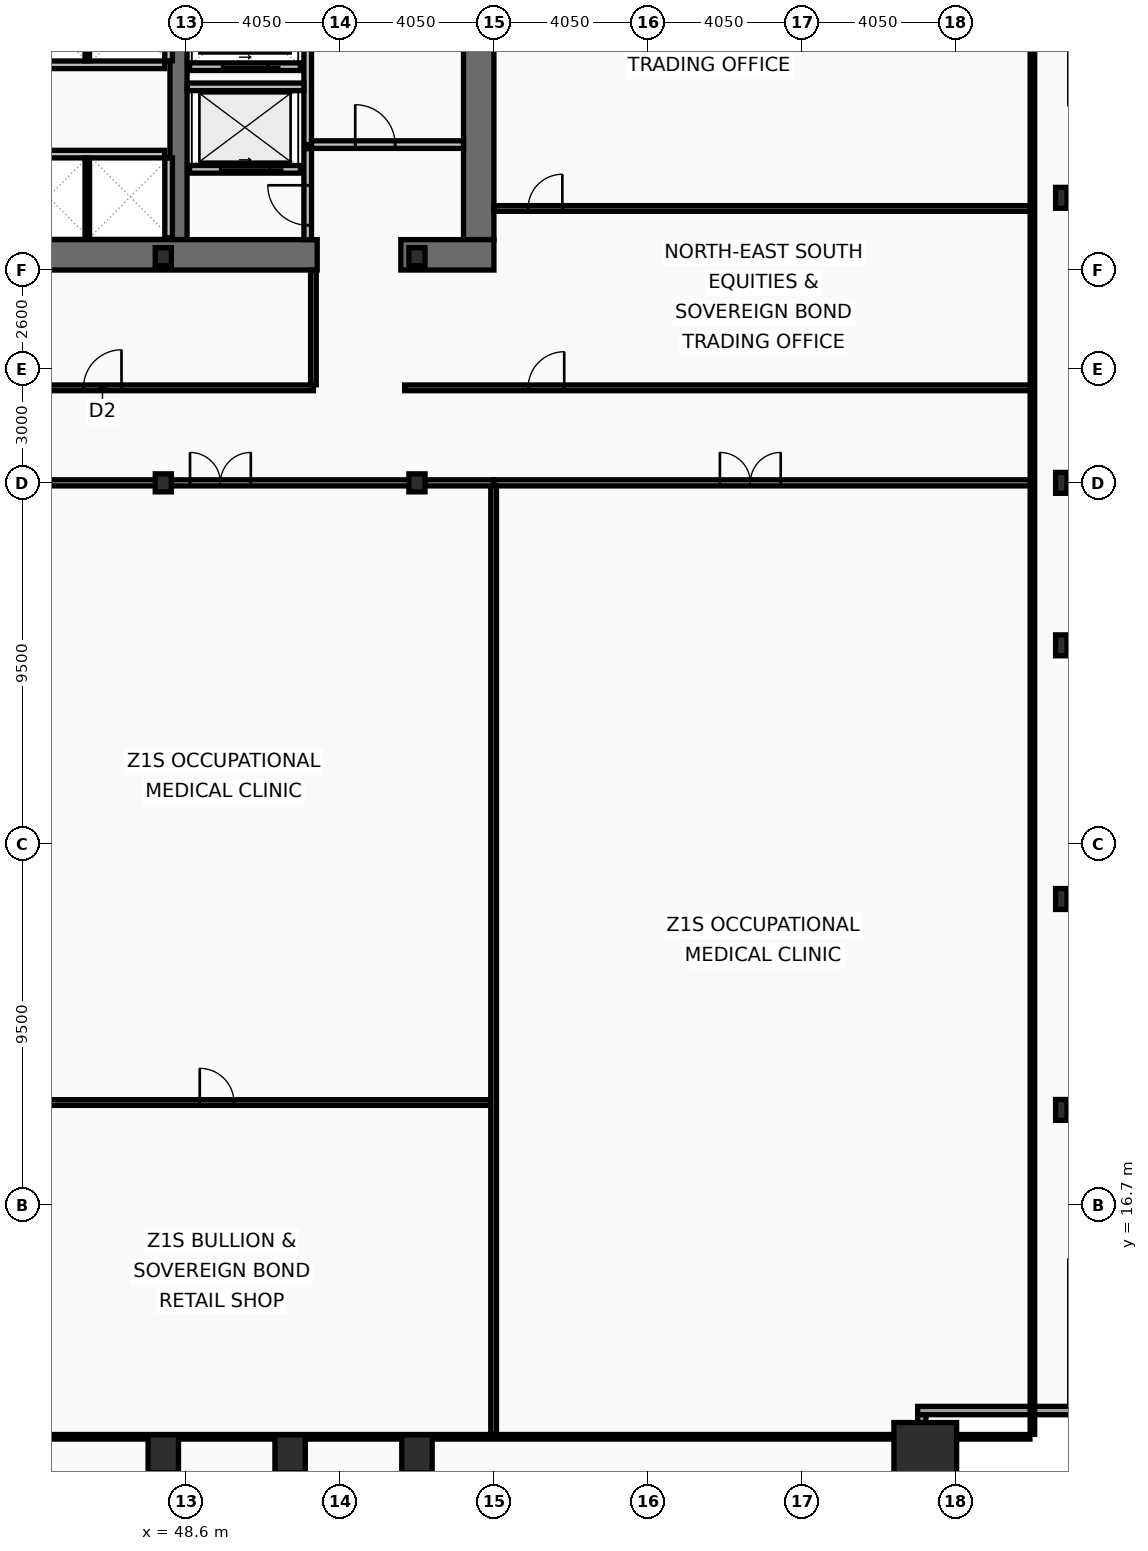
"""IFC4 building model, lengths in metres.
Left out: names, types, materials, properties, quantities, classifications, styles, units other than length and angle.
Written with IfcOpenShell. Run it as: python <this file> out.ifc"""

import sys

from ifc_helpers import new_model, si_unit, direction, frame, frame_2d, origin, origin_2d, place, context, subcontext, project, spatial, rectangle, hollow_rectangle, i_section, extrude, element, fill, save


model = new_model("IFC4")
c1 = context("Model", 3, precision=1e-05, world=origin(), true_north=direction((0.0, 1.0)))
c2 = subcontext(c1, "Body", "Model", "MODEL_VIEW")
j1 = project(units=[si_unit("LENGTHUNIT", "METRE"), si_unit("PLANEANGLEUNIT", "RADIAN")], contexts=[c1])
p1 = place(None, origin())
s1 = spatial("IfcSite", under=j1, at=p1, CompositionType="ELEMENT")
p2 = place(p1, origin())
s2 = spatial("IfcBuilding", under=s1, at=p2, CompositionType="ELEMENT")
p3 = place(p2, frame((0.0, 0.0, 29.8)))
s3 = spatial("IfcBuildingStorey", under=s2, at=p3, CompositionType="ELEMENT", Elevation=29.8)
p4 = place(p3, frame((56.3, 52.9, 0.0), z_axis=(0.0, 0.0, 1.0), x_axis=(0.0, -1.0, 0.0)))
e1 = element("IfcWall", 1, at=p4, inside=s3, PredefinedType="SHEAR", context=c2, shape_type="SweptSolid", body=[
    extrude(rectangle(XDim=10.8, YDim=0.8, at=frame_2d((5.4, 0.0))), origin(), (0.0, 0.0, 1.0), 3.82),
])
p5 = place(p3, frame((48.4, 42.1, 0.0), z_axis=(0.0, 0.0, 1.0), x_axis=(0.0, 1.0, 0.0)))
e2 = element("IfcWall", 2, at=p5, inside=s3, PredefinedType="SHEAR", context=c2, shape_type="SweptSolid", body=[
    extrude(rectangle(XDim=10.8, YDim=0.45, at=frame_2d((5.4, 0.0))), origin(), (0.0, 0.0, 1.0), 3.82),
])
p6 = place(p3, frame((52.05, 41.7, 0.0), z_axis=(0.0, 0.0, 1.0), x_axis=(-1.0, 0.0, 0.0)))
e3 = element("IfcWall", 3, at=p6, inside=s3, PredefinedType="SHEAR", context=c2, shape_type="SweptSolid", body=[
    extrude(rectangle(XDim=11.3, YDim=0.8, at=frame_2d((5.65, 0.0))), origin(), (0.0, 0.0, 1.0), 3.82),
])
p7 = place(p3, frame((56.7, 41.7, 0.0), z_axis=(0.0, 0.0, 1.0), x_axis=(-1.0, 0.0, 0.0)))
e4 = element("IfcWall", 4, at=p7, inside=s3, PredefinedType="SHEAR", context=c2, shape_type="SweptSolid", body=[
    extrude(rectangle(XDim=2.45, YDim=0.8, at=frame_2d((1.225, 0.0))), origin(), (0.0, 0.0, 1.0), 3.82),
])
p8 = place(p3, frame((68.05, 10.15, 0.0), z_axis=(0.0, 0.0, 1.0), x_axis=(1.0, 0.0, 0.0)))
e5 = element("IfcColumn", 5, at=p8, inside=s3, PredefinedType="COLUMN", context=c2, shape_type="SweptSolid", body=[
    extrude(hollow_rectangle(XDim=1.65, YDim=1.65, WallThickness=0.075, at=origin_2d()), origin(), (0.0, 0.0, 1.0), 4.0),
])
for number, where, z_axis, x_axis in (
    (6, (48.0, 10.15, 0.0), (0.0, 0.0, 1.0), (1.0, 0.0, 0.0)),
    (7, (51.337, 10.15, 0.0), (0.0, 0.0, 1.0), (1.0, 0.0, 0.0)),
    (8, (54.675, 10.15, 0.0), (0.0, 0.0, 1.0), (1.0, 0.0, 0.0)),
):
    element("IfcColumn", number, at=place(p3, frame(where, z_axis=z_axis, x_axis=x_axis)), inside=s3, PredefinedType="COLUMN", context=c2, shape_type="SweptSolid", body=[
        extrude(hollow_rectangle(XDim=0.8, YDim=1.0, WallThickness=0.055, at=origin_2d()), origin(), (0.0, 0.0, 1.0), 4.0),
    ])
for number, where, z_axis, x_axis in (
    (9, (71.63, 19.2, 0.0), (0.0, 0.0, 1.0), (1.0, 0.0, 0.0)),
    (10, (71.63, 24.75, 0.0), (0.0, 0.0, 1.0), (1.0, 0.0, 0.0)),
    (11, (71.63, 31.425, 0.0), (0.0, 0.0, 1.0), (1.0, 0.0, 0.0)),
    (12, (71.63, 35.7, 0.0), (0.0, 0.0, 1.0), (1.0, 0.0, 0.0)),
    (13, (71.63, 43.2, 0.0), (0.0, 0.0, 1.0), (1.0, 0.0, 0.0)),
):
    element("IfcColumn", number, at=place(p3, frame(where, z_axis=z_axis, x_axis=x_axis)), inside=s3, PredefinedType="COLUMN", context=c2, shape_type="SweptSolid", body=[
        extrude(i_section(OverallWidth=0.3, OverallDepth=0.55, WebThickness=0.015, FlangeThickness=0.029, at=origin_2d()), origin(), (0.0, 0.0, 1.0), 4.0),
    ])
for number, where, z_axis, x_axis in (
    (14, (48.0, 35.7, 0.0), (0.0, 0.0, 1.0), (1.0, 0.0, 0.0)),
    (15, (48.0, 41.65, 0.0), (0.0, 0.0, 1.0), (1.0, 0.0, 0.0)),
    (16, (54.675, 35.7, 0.0), (0.0, 0.0, 1.0), (1.0, 0.0, 0.0)),
    (17, (54.675, 41.65, 0.0), (0.0, 0.0, 1.0), (1.0, 0.0, 0.0)),
):
    element("IfcColumn", number, at=place(p3, frame(where, z_axis=z_axis, x_axis=x_axis)), inside=s3, PredefinedType="COLUMN", context=c2, shape_type="SweptSolid", body=[
        extrude(i_section(OverallWidth=0.424, OverallDepth=0.474, WebThickness=0.048, FlangeThickness=0.077, at=origin_2d()), origin(), (0.0, 0.0, 1.0), 4.0),
    ])
p9 = place(p3, frame((72.07, 11.29, 0.0), z_axis=(0.0, 0.0, 1.0), x_axis=(-1.0, 0.0, 0.0)))
e18 = element("IfcWall", 18, at=p9, inside=s3, PredefinedType="SOLIDWALL", context=c2, shape_type="SweptSolid", body=[
    extrude(rectangle(XDim=4.22, YDim=0.22, at=frame_2d((2.11, 0.0))), origin(), (0.0, 0.0, 1.0), 3.16),
])
p10 = place(p3, frame((67.96, 11.18, 0.0), z_axis=(0.0, 0.0, 1.0), x_axis=(0.0, -1.0, 0.0)))
e19 = element("IfcWall", 19, at=p10, inside=s3, PredefinedType="SOLIDWALL", context=c2, shape_type="SweptSolid", body=[
    extrude(rectangle(XDim=3.91, YDim=0.22, at=frame_2d((1.955, 0.0))), origin(), (0.0, 0.0, 1.0), 3.16),
])
p11 = place(p3, frame((51.61, 43.95, 0.0), z_axis=(0.0, 0.0, 1.0), x_axis=(-1.0, 0.0, 0.0)))
e20 = element("IfcWall", 20, at=p11, inside=s3, PredefinedType="PARTITIONING", context=c2, shape_type="SweptSolid", body=[
    extrude(rectangle(XDim=2.92, YDim=0.2, at=frame_2d((1.46, 0.0))), origin(), (0.0, 0.0, 1.0), 3.82),
])
p12 = place(p11, frame((0.81, 0.0, 0.0)))
e21 = element("IfcOpeningElement", 21, at=p12, cuts=e20, PredefinedType="OPENING", context=c2, shape_type="SweptSolid", body=[
    extrude(rectangle(XDim=1.3, YDim=2.18, at=frame_2d((0.65, 1.09))), frame((0.0, 0.11, 0.0), z_axis=(0.0, -1.0, 0.0), x_axis=(1.0, 0.0, 0.0)), (0.0, 0.0, 1.0), 0.22),
])
p13 = place(p3, frame((51.61, 46.65, 0.0), z_axis=(0.0, 0.0, 1.0), x_axis=(-1.0, 0.0, 0.0)))
e22 = element("IfcWall", 22, at=p13, inside=s3, PredefinedType="PARTITIONING", context=c2, shape_type="SweptSolid", body=[
    extrude(rectangle(XDim=2.92, YDim=0.2, at=frame_2d((1.46, 0.0))), origin(), (0.0, 0.0, 1.0), 3.82),
])
p14 = place(p13, frame((0.86, 0.0, 0.0)))
e23 = element("IfcOpeningElement", 23, at=p14, cuts=e22, PredefinedType="OPENING", context=c2, shape_type="SweptSolid", body=[
    extrude(rectangle(XDim=1.2, YDim=2.18, at=frame_2d((0.6, 1.09))), frame((0.0, 0.11, 0.0), z_axis=(0.0, -1.0, 0.0), x_axis=(1.0, 0.0, 0.0)), (0.0, 0.0, 1.0), 0.22),
])
p15 = place(p3, frame((51.8, 44.6, 0.0), z_axis=(0.0, 0.0, 1.0), x_axis=(0.0, 1.0, 0.0)))
e24 = element("IfcWall", 24, at=p15, inside=s3, PredefinedType="PARTITIONING", context=c2, shape_type="SweptSolid", body=[
    extrude(rectangle(XDim=4.3, YDim=0.2, at=frame_2d((2.15, 0.0))), origin(), (0.0, 0.0, 1.0), 3.82),
])
p16 = place(p3, frame((51.9, 44.6, 0.0), z_axis=(0.0, 0.0, 1.0), x_axis=(1.0, 0.0, 0.0)))
e25 = element("IfcWall", 25, at=p16, inside=s3, PredefinedType="PARTITIONING", context=c2, shape_type="SweptSolid", body=[
    extrude(rectangle(XDim=4.0, YDim=0.2, at=frame_2d((2.0, 0.0))), origin(), (0.0, 0.0, 1.0), 3.82),
])
p17 = place(p16, frame((1.15, 0.0, 0.0)))
e26 = element("IfcOpeningElement", 26, at=p17, cuts=e25, PredefinedType="OPENING", context=c2, shape_type="SweptSolid", body=[
    extrude(rectangle(XDim=1.05, YDim=2.15, at=frame_2d((0.525, 1.075))), frame((0.0, 0.11, 0.0), z_axis=(0.0, -1.0, 0.0), x_axis=(1.0, 0.0, 0.0)), (0.0, 0.0, 1.0), 0.22),
])
p18 = place(p3, frame((48.63, 46.12, 0.0), z_axis=(0.0, 0.0, 1.0), x_axis=(1.0, 0.0, 0.0)))
e27 = element("IfcWall", 27, at=p18, inside=s3, PredefinedType="PARTITIONING", context=c2, shape_type="SweptSolid", body=[
    extrude(rectangle(XDim=3.07, YDim=0.2, at=frame_2d((1.535, 0.0))), origin(), (0.0, 0.0, 1.0), 3.82),
])
p19 = place(p3, frame((51.8, 42.1, 0.0), z_axis=(0.0, 0.0, 1.0), x_axis=(0.0, 1.0, 0.0)))
e28 = element("IfcWall", 28, at=p19, inside=s3, PredefinedType="PARTITIONING", context=c2, shape_type="SweptSolid", body=[
    extrude(rectangle(XDim=2.395, YDim=0.2, at=frame_2d((1.198, 0.0))), origin(), (0.0, 0.0, 1.0), 3.82),
])
p20 = place(p19, frame((0.38, 0.0, 0.0)))
e29 = element("IfcOpeningElement", 29, at=p20, cuts=e28, PredefinedType="OPENING", context=c2, shape_type="SweptSolid", body=[
    extrude(rectangle(XDim=1.05, YDim=2.15, at=frame_2d((0.525, 1.075))), frame((0.0, 0.11, 0.0), z_axis=(0.0, -1.0, 0.0), x_axis=(1.0, 0.0, 0.0)), (0.0, 0.0, 1.0), 0.22),
])
p21 = place(p3, frame((41.825, 46.7, 0.0), z_axis=(0.0, 0.0, 1.0), x_axis=(1.0, 0.0, 0.0)))
e30 = element("IfcWall", 30, at=p21, inside=s3, PredefinedType="PARTITIONING", context=c2, shape_type="SweptSolid", body=[
    extrude(rectangle(XDim=6.21, YDim=0.2, at=frame_2d((3.105, 0.0))), origin(), (0.0, 0.0, 1.0), 3.82),
])
p22 = place(p3, frame((48.14, 46.805, 0.0), z_axis=(0.0, 0.0, 1.0), x_axis=(0.0, 1.0, 0.0)))
e31 = element("IfcWall", 31, at=p22, inside=s3, PredefinedType="PARTITIONING", context=c2, shape_type="SweptSolid", body=[
    extrude(rectangle(XDim=2.09, YDim=0.2, at=frame_2d((1.045, 0.0))), origin(), (0.0, 0.0, 1.0), 3.82),
])
p23 = place(p3, frame((46.0, 46.805, 0.0), z_axis=(0.0, 0.0, 1.0), x_axis=(0.0, 1.0, 0.0)))
e32 = element("IfcWall", 32, at=p23, inside=s3, PredefinedType="PARTITIONING", context=c2, shape_type="SweptSolid", body=[
    extrude(rectangle(XDim=2.09, YDim=0.12, at=frame_2d((1.045, 0.0))), origin(), (0.0, 0.0, 1.0), 3.82),
])
p24 = place(p3, frame((41.825, 44.35, 0.0), z_axis=(0.0, 0.0, 1.0), x_axis=(1.0, 0.0, 0.0)))
e33 = element("IfcWall", 33, at=p24, inside=s3, PredefinedType="PARTITIONING", context=c2, shape_type="SweptSolid", body=[
    extrude(rectangle(XDim=6.21, YDim=0.2, at=frame_2d((3.105, 0.0))), origin(), (0.0, 0.0, 1.0), 3.82),
])
p25 = place(p3, frame((48.14, 42.15, 0.0), z_axis=(0.0, 0.0, 1.0), x_axis=(0.0, 1.0, 0.0)))
e34 = element("IfcWall", 34, at=p25, inside=s3, PredefinedType="PARTITIONING", context=c2, shape_type="SweptSolid", body=[
    extrude(rectangle(XDim=2.095, YDim=0.2, at=frame_2d((1.048, 0.0))), origin(), (0.0, 0.0, 1.0), 3.82),
])
p26 = place(p3, frame((46.0, 42.15, 0.0), z_axis=(0.0, 0.0, 1.0), x_axis=(0.0, 1.0, 0.0)))
e35 = element("IfcWall", 35, at=p26, inside=s3, PredefinedType="PARTITIONING", context=c2, shape_type="SweptSolid", body=[
    extrude(rectangle(XDim=2.095, YDim=0.12, at=frame_2d((1.048, 0.0))), origin(), (0.0, 0.0, 1.0), 3.82),
])
p27 = place(p3, frame((44.8, 38.2, 0.0), z_axis=(0.0, 0.0, 1.0), x_axis=(1.0, 0.0, 0.0)))
e36 = element("IfcWall", 36, at=p27, inside=s3, PredefinedType="PARTITIONING", context=c2, shape_type="SweptSolid", body=[
    extrude(rectangle(XDim=7.15, YDim=0.15, at=frame_2d((3.575, 0.0))), origin(), (0.0, 0.0, 1.0), 3.01),
])
p28 = place(p27, frame((1.1, 0.0, 0.0)))
e37 = element("IfcOpeningElement", 37, at=p28, cuts=e36, PredefinedType="OPENING", context=c2, shape_type="SweptSolid", body=[
    extrude(rectangle(XDim=1.0, YDim=2.05, at=frame_2d((0.5, 1.025))), frame((0.0, 0.085, 0.0), z_axis=(0.0, -1.0, 0.0), x_axis=(1.0, 0.0, 0.0)), (0.0, 0.0, 1.0), 0.17),
])
p29 = place(p3, frame((51.95, 38.28, 0.0), z_axis=(0.0, 0.0, 1.0), x_axis=(0.0, 1.0, 0.0)))
e38 = element("IfcWall", 38, at=p29, inside=s3, PredefinedType="PARTITIONING", context=c2, shape_type="SweptSolid", body=[
    extrude(rectangle(XDim=3.02, YDim=0.15, at=frame_2d((1.51, 0.0))), origin(), (0.0, 0.0, 1.0), 3.82),
])
p30 = place(p3, frame((54.35, 38.2, 0.0), z_axis=(0.0, 0.0, 1.0), x_axis=(1.0, 0.0, 0.0)))
e39 = element("IfcWall", 39, at=p30, inside=s3, PredefinedType="PARTITIONING", context=c2, shape_type="SweptSolid", body=[
    extrude(rectangle(XDim=16.52, YDim=0.15, at=frame_2d((8.26, 0.0))), origin(), (0.0, 0.0, 1.0), 3.01),
])
p31 = place(p30, frame((3.25, 0.0, 0.0)))
e40 = element("IfcOpeningElement", 40, at=p31, cuts=e39, PredefinedType="OPENING", context=c2, shape_type="SweptSolid", body=[
    extrude(rectangle(XDim=0.95, YDim=2.05, at=frame_2d((0.475, 1.025))), frame((0.0, 0.085, 0.0), z_axis=(0.0, -1.0, 0.0), x_axis=(1.0, 0.0, 0.0)), (0.0, 0.0, 1.0), 0.17),
])
p32 = place(p3, frame((56.7, 42.92, 0.0), z_axis=(0.0, 0.0, 1.0), x_axis=(1.0, 0.0, 0.0)))
e41 = element("IfcWall", 41, at=p32, inside=s3, PredefinedType="PARTITIONING", context=c2, shape_type="SweptSolid", body=[
    extrude(rectangle(XDim=14.105, YDim=0.15, at=frame_2d((7.052, 0.0))), origin(), (0.0, 0.0, 1.0), 3.01),
])
p33 = place(p32, frame((0.9, 0.0, 0.0)))
e42 = element("IfcOpeningElement", 42, at=p33, cuts=e41, PredefinedType="OPENING", context=c2, shape_type="SweptSolid", body=[
    extrude(rectangle(XDim=0.9, YDim=2.05, at=frame_2d((0.45, 1.025))), frame((0.0, 0.085, 0.0), z_axis=(0.0, -1.0, 0.0), x_axis=(1.0, 0.0, 0.0)), (0.0, 0.0, 1.0), 0.17),
])
p34 = place(p3, frame((42.487, 35.7, 0.0), z_axis=(0.0, 0.0, 1.0), x_axis=(1.0, 0.0, 0.0)))
e43 = element("IfcWall", 43, at=p34, inside=s3, PredefinedType="PARTITIONING", context=c2, shape_type="SweptSolid", body=[
    extrude(rectangle(XDim=14.205, YDim=0.16, at=frame_2d((7.103, 0.0))), origin(), (0.0, 0.0, 1.0), 3.01),
])
p35 = place(p34, frame((6.216, 0.0, 0.0)))
e44 = element("IfcOpeningElement", 44, at=p35, cuts=e43, PredefinedType="OPENING", context=c2, shape_type="SweptSolid", body=[
    extrude(rectangle(XDim=1.6, YDim=2.15, at=frame_2d((0.8, 1.075))), frame((0.0, 0.09, 0.0), z_axis=(0.0, -1.0, 0.0), x_axis=(1.0, 0.0, 0.0)), (0.0, 0.0, 1.0), 0.18),
])
p36 = place(p3, frame((42.567, 19.395, 0.0), z_axis=(0.0, 0.0, 1.0), x_axis=(1.0, 0.0, 0.0)))
e45 = element("IfcWall", 45, at=p36, inside=s3, PredefinedType="PARTITIONING", context=c2, shape_type="SweptSolid", body=[
    extrude(rectangle(XDim=14.046, YDim=0.15, at=frame_2d((7.023, 0.0))), origin(), (0.0, 0.0, 1.0), 3.01),
])
p37 = place(p36, frame((6.393, 0.0, 0.0)))
e46 = element("IfcOpeningElement", 46, at=p37, cuts=e45, PredefinedType="OPENING", context=c2, shape_type="SweptSolid", body=[
    extrude(rectangle(XDim=0.9, YDim=2.05, at=frame_2d((0.45, 1.025))), frame((0.0, 0.085, 0.0), z_axis=(0.0, -1.0, 0.0), x_axis=(1.0, 0.0, 0.0)), (0.0, 0.0, 1.0), 0.17),
])
p38 = place(p3, frame((56.692, 35.7, 0.0), z_axis=(0.0, 0.0, 1.0), x_axis=(1.0, 0.0, 0.0)))
e47 = element("IfcWall", 47, at=p38, inside=s3, PredefinedType="PARTITIONING", context=c2, shape_type="SweptSolid", body=[
    extrude(rectangle(XDim=14.178, YDim=0.16, at=frame_2d((7.089, 0.0))), origin(), (0.0, 0.0, 1.0), 3.01),
])
p39 = place(p38, frame((5.955, 0.0, 0.0)))
e48 = element("IfcOpeningElement", 48, at=p39, cuts=e47, PredefinedType="OPENING", context=c2, shape_type="SweptSolid", body=[
    extrude(rectangle(XDim=1.6, YDim=2.15, at=frame_2d((0.8, 1.075))), frame((0.0, 0.09, 0.0), z_axis=(0.0, -1.0, 0.0), x_axis=(1.0, 0.0, 0.0)), (0.0, 0.0, 1.0), 0.18),
])
p40 = place(p3, frame((56.692, 10.665, 0.0), z_axis=(0.0, 0.0, 1.0), x_axis=(0.0, 1.0, 0.0)))
e49 = element("IfcWall", 49, at=p40, inside=s3, PredefinedType="PARTITIONING", context=c2, shape_type="SweptSolid", body=[
    extrude(rectangle(XDim=24.95, YDim=0.15, at=frame_2d((12.475, 0.0))), origin(), (0.0, 0.0, 1.0), 3.01),
])
p41 = place(p3, frame((70.87, 10.665, 0.0), z_axis=(0.0, 0.0, 1.0), x_axis=(0.0, 1.0, 0.0)))
e50 = element("IfcWall", 50, at=p41, inside=s3, PredefinedType="PARTITIONING", context=c2, shape_type="SweptSolid", body=[
    extrude(rectangle(XDim=42.11, YDim=0.12, at=frame_2d((21.055, 0.0))), origin(), (0.0, 0.0, 1.0), 3.01),
])
p42 = place(p3, frame((2.095, 10.6, 0.0), z_axis=(0.0, 0.0, 1.0), x_axis=(1.0, 0.0, 0.0)))
e51 = element("IfcWall", 51, at=p42, inside=s3, PredefinedType="PARTITIONING", context=c2, shape_type="SweptSolid", body=[
    extrude(rectangle(XDim=68.71, YDim=0.12, at=frame_2d((34.355, 0.0))), origin(), (0.0, 0.0, 1.0), 3.01),
])
p43 = place(p12, origin())
e52 = element("IfcDoor", 52, at=p43, inside=s3, OperationType="SLIDING_TO_LEFT", PredefinedType="DOOR", context=c2, shape_type="SweptSolid", body=[
    extrude(rectangle(XDim=1.3, YDim=2.18, at=frame_2d((0.65, 1.09))), frame((0.0, 0.025, 0.0), z_axis=(0.0, -1.0, 0.0), x_axis=(1.0, 0.0, 0.0)), (0.0, 0.0, 1.0), 0.05),
])
fill(e21, e52)
p44 = place(p14, origin())
e53 = element("IfcDoor", 53, at=p44, inside=s3, OperationType="SLIDING_TO_LEFT", PredefinedType="DOOR", context=c2, shape_type="SweptSolid", body=[
    extrude(rectangle(XDim=1.2, YDim=2.18, at=frame_2d((0.6, 1.09))), frame((0.0, 0.025, 0.0), z_axis=(0.0, -1.0, 0.0), x_axis=(1.0, 0.0, 0.0)), (0.0, 0.0, 1.0), 0.05),
])
fill(e23, e53)
p45 = place(p17, origin())
e54 = element("IfcDoor", 54, at=p45, inside=s3, OperationType="SINGLE_SWING_LEFT", PredefinedType="DOOR", context=c2, shape_type="SweptSolid", body=[
    extrude(rectangle(XDim=1.05, YDim=2.15, at=frame_2d((0.525, 1.075))), frame((0.0, 0.025, 0.0), z_axis=(0.0, -1.0, 0.0), x_axis=(1.0, 0.0, 0.0)), (0.0, 0.0, 1.0), 0.05),
])
fill(e26, e54)
p46 = place(p20, origin())
e55 = element("IfcDoor", 55, at=p46, inside=s3, OperationType="SINGLE_SWING_RIGHT", PredefinedType="DOOR", context=c2, shape_type="SweptSolid", body=[
    extrude(rectangle(XDim=1.05, YDim=2.15, at=frame_2d((0.525, 1.075))), frame((0.0, 0.025, 0.0), z_axis=(0.0, -1.0, 0.0), x_axis=(1.0, 0.0, 0.0)), (0.0, 0.0, 1.0), 0.05),
])
fill(e29, e55)
p47 = place(p28, origin())
e56 = element("IfcDoor", 56, at=p47, inside=s3, OperationType="SINGLE_SWING_RIGHT", PredefinedType="DOOR", context=c2, shape_type="SweptSolid", body=[
    extrude(rectangle(XDim=1.0, YDim=2.05, at=frame_2d((0.5, 1.025))), frame((0.0, 0.025, 0.0), z_axis=(0.0, -1.0, 0.0), x_axis=(1.0, 0.0, 0.0)), (0.0, 0.0, 1.0), 0.05),
])
fill(e37, e56)
p48 = place(p31, origin())
e57 = element("IfcDoor", 57, at=p48, inside=s3, OperationType="SINGLE_SWING_RIGHT", PredefinedType="DOOR", context=c2, shape_type="SweptSolid", body=[
    extrude(rectangle(XDim=0.95, YDim=2.05, at=frame_2d((0.475, 1.025))), frame((0.0, 0.025, 0.0), z_axis=(0.0, -1.0, 0.0), x_axis=(1.0, 0.0, 0.0)), (0.0, 0.0, 1.0), 0.05),
])
fill(e40, e57)
p49 = place(p33, origin())
e58 = element("IfcDoor", 58, at=p49, inside=s3, OperationType="SINGLE_SWING_RIGHT", PredefinedType="DOOR", context=c2, shape_type="SweptSolid", body=[
    extrude(rectangle(XDim=0.9, YDim=2.05, at=frame_2d((0.45, 1.025))), frame((0.0, 0.025, 0.0), z_axis=(0.0, -1.0, 0.0), x_axis=(1.0, 0.0, 0.0)), (0.0, 0.0, 1.0), 0.05),
])
fill(e42, e58)
p50 = place(p35, origin())
e59 = element("IfcDoor", 59, at=p50, inside=s3, OperationType="DOUBLE_DOOR_SINGLE_SWING", PredefinedType="DOOR", context=c2, shape_type="SweptSolid", body=[
    extrude(rectangle(XDim=1.6, YDim=2.15, at=frame_2d((0.8, 1.075))), frame((0.0, 0.025, 0.0), z_axis=(0.0, -1.0, 0.0), x_axis=(1.0, 0.0, 0.0)), (0.0, 0.0, 1.0), 0.05),
])
fill(e44, e59)
p51 = place(p37, origin())
e60 = element("IfcDoor", 60, at=p51, inside=s3, OperationType="SINGLE_SWING_LEFT", PredefinedType="DOOR", context=c2, shape_type="SweptSolid", body=[
    extrude(rectangle(XDim=0.9, YDim=2.05, at=frame_2d((0.45, 1.025))), frame((0.0, 0.025, 0.0), z_axis=(0.0, -1.0, 0.0), x_axis=(1.0, 0.0, 0.0)), (0.0, 0.0, 1.0), 0.05),
])
fill(e46, e60)
p52 = place(p39, origin())
e61 = element("IfcDoor", 61, at=p52, inside=s3, OperationType="DOUBLE_DOOR_SINGLE_SWING", PredefinedType="DOOR", context=c2, shape_type="SweptSolid", body=[
    extrude(rectangle(XDim=1.6, YDim=2.15, at=frame_2d((0.8, 1.075))), frame((0.0, 0.025, 0.0), z_axis=(0.0, -1.0, 0.0), x_axis=(1.0, 0.0, 0.0)), (0.0, 0.0, 1.0), 0.05),
])
fill(e48, e61)
save(model, sys.argv[1])
